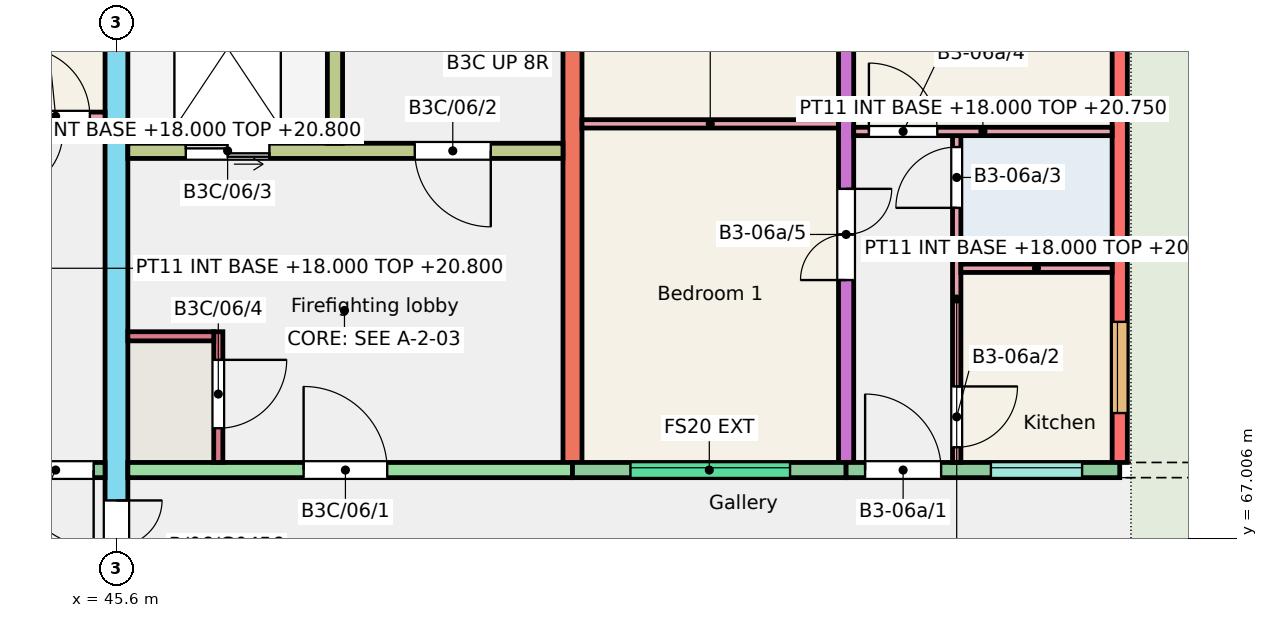
"""IFC4 building model, lengths in metres.
Left out: names, types, materials, properties, quantities, classifications, styles, units other than length and angle.
Written with IfcOpenShell. Run it as: python <this file> out.ifc"""

import sys

from ifc_helpers import new_model, si_unit, direction, frame, frame_2d, origin, place, context, subcontext, project, spatial, rectangle, extrude, element, fill, save


model = new_model("IFC4")
c1 = context("Model", 3, precision=1e-05, world=origin(), true_north=direction((0.0, 1.0)))
c2 = subcontext(c1, "Body", "Model", "MODEL_VIEW")
j1 = project(units=[si_unit("LENGTHUNIT", "METRE"), si_unit("PLANEANGLEUNIT", "RADIAN")], contexts=[c1])
p1 = place(None, origin())
s1 = spatial("IfcSite", under=j1, at=p1, CompositionType="ELEMENT")
p2 = place(p1, origin())
s2 = spatial("IfcBuilding", under=s1, at=p2, CompositionType="ELEMENT")
p3 = place(p2, frame((0.0, 0.0, 18.0)))
s3 = spatial("IfcBuildingStorey", under=s2, at=p3, CompositionType="ELEMENT", Elevation=18.0)
p4 = place(p3, frame((45.6, 66.0, 0.0), z_axis=(0.0, 0.0, 1.0), x_axis=(0.0, 1.0, 0.0)))
e1 = element("IfcWall", 1, at=p4, inside=s3, PredefinedType="SHEAR", context=c2, shape_type="SweptSolid", body=[
    extrude(rectangle(XDim=11.0, YDim=0.3, at=frame_2d((5.5, 0.0))), origin(), (0.0, 0.0, 1.0), 3.0),
])
p5 = place(p4, frame((0.3, 0.0, 0.0)))
e2 = element("IfcOpeningElement", 2, at=p5, cuts=e1, PredefinedType="OPENING", context=c2, shape_type="SweptSolid", body=[
    extrude(rectangle(XDim=1.2, YDim=2.1, at=frame_2d((0.6, 1.05))), frame((0.0, 0.16, 0.0), z_axis=(0.0, -1.0, 0.0), x_axis=(1.0, 0.0, 0.0)), (0.0, 0.0, 1.0), 0.32),
])
p6 = place(p3, frame((51.6, 68.0, 0.0), z_axis=(0.0, 0.0, 1.0), x_axis=(0.0, 1.0, 0.0)))
e3 = element("IfcWall", 3, at=p6, inside=s3, PredefinedType="SHEAR", context=c2, shape_type="SweptSolid", body=[
    extrude(rectangle(XDim=9.0, YDim=0.25, at=frame_2d((4.5, 0.0))), origin(), (0.0, 0.0, 1.0), 3.0),
])
p7 = place(p3, frame((55.2, 68.0, 0.0), z_axis=(0.0, 0.0, 1.0), x_axis=(0.0, 1.0, 0.0)))
e4 = element("IfcWall", 4, at=p7, inside=s3, PredefinedType="SHEAR", context=c2, shape_type="SweptSolid", body=[
    extrude(rectangle(XDim=9.0, YDim=0.2, at=frame_2d((4.5, 0.0))), origin(), (0.0, 0.0, 1.0), 3.0),
])
p8 = place(p7, frame((2.4, 0.0, 0.0)))
e5 = element("IfcOpeningElement", 5, at=p8, cuts=e4, PredefinedType="OPENING", context=c2, shape_type="SweptSolid", body=[
    extrude(rectangle(XDim=1.2, YDim=2.1, at=frame_2d((0.6, 1.05))), frame((0.0, 0.11, 0.0), z_axis=(0.0, -1.0, 0.0), x_axis=(1.0, 0.0, 0.0)), (0.0, 0.0, 1.0), 0.22),
])
p9 = place(p7, frame((6.4, 0.0, 0.0)))
e6 = element("IfcOpeningElement", 6, at=p9, cuts=e4, PredefinedType="OPENING", context=c2, shape_type="SweptSolid", body=[
    extrude(rectangle(XDim=1.2, YDim=2.1, at=frame_2d((0.6, 1.05))), frame((0.0, 0.11, 0.0), z_axis=(0.0, -1.0, 0.0), x_axis=(1.0, 0.0, 0.0)), (0.0, 0.0, 1.0), 0.22),
])
p10 = place(p3, frame((58.8, 68.0, 0.0), z_axis=(0.0, 0.0, 1.0), x_axis=(0.0, 1.0, 0.0)))
e7 = element("IfcWall", 7, at=p10, inside=s3, PredefinedType="SHEAR", context=c2, shape_type="SweptSolid", body=[
    extrude(rectangle(XDim=9.0, YDim=0.2, at=frame_2d((4.5, 0.0))), origin(), (0.0, 0.0, 1.0), 3.0),
])
p11 = place(p10, frame((0.65, 0.0, 0.9)))
e8 = element("IfcOpeningElement", 8, at=p11, cuts=e7, PredefinedType="OPENING", context=c2, shape_type="SweptSolid", body=[
    extrude(rectangle(XDim=1.2, YDim=1.5, at=frame_2d((0.6, 0.75))), frame((0.0, 0.11, 0.0), z_axis=(0.0, -1.0, 0.0), x_axis=(1.0, 0.0, 0.0)), (0.0, 0.0, 1.0), 0.22),
])
p12 = place(p10, frame((7.552, 0.0, 0.9)))
e9 = element("IfcOpeningElement", 9, at=p12, cuts=e7, PredefinedType="OPENING", context=c2, shape_type="SweptSolid", body=[
    extrude(rectangle(XDim=1.2, YDim=1.5, at=frame_2d((0.6, 0.75))), frame((0.0, 0.11, 0.0), z_axis=(0.0, -1.0, 0.0), x_axis=(1.0, 0.0, 0.0)), (0.0, 0.0, 1.0), 0.22),
])
p13 = place(p10, frame((6.205, 0.0, 0.0)))
e10 = element("IfcOpeningElement", 10, at=p13, cuts=e7, PredefinedType="OPENING", context=c2, shape_type="SweptSolid", body=[
    extrude(rectangle(XDim=1.0, YDim=2.1, at=frame_2d((0.5, 1.05))), frame((0.0, 0.11, 0.0), z_axis=(0.0, -1.0, 0.0), x_axis=(1.0, 0.0, 0.0)), (0.0, 0.0, 1.0), 0.22),
])
p14 = place(p3, frame((42.0, 67.9, 0.0), z_axis=(0.0, 0.0, 1.0), x_axis=(1.0, 0.0, 0.0)))
e11 = element("IfcWall", 11, at=p14, inside=s3, PredefinedType="SOLIDWALL", context=c2, shape_type="SweptSolid", body=[
    extrude(rectangle(XDim=3.45, YDim=0.2, at=frame_2d((1.725, 0.0))), origin(), (0.0, 0.0, 1.0), 3.0),
])
p15 = place(p14, frame((0.47, 0.0, 1.1)))
e12 = element("IfcOpeningElement", 12, at=p15, cuts=e11, PredefinedType="OPENING", context=c2, shape_type="SweptSolid", body=[
    extrude(rectangle(XDim=1.2, YDim=1.3, at=frame_2d((0.6, 0.65))), frame((0.0, 0.11, 0.0), z_axis=(0.0, -1.0, 0.0), x_axis=(1.0, 0.0, 0.0)), (0.0, 0.0, 1.0), 0.22),
])
p16 = place(p14, frame((2.3, 0.0, 0.0)))
e13 = element("IfcOpeningElement", 13, at=p16, cuts=e11, PredefinedType="OPENING", context=c2, shape_type="SweptSolid", body=[
    extrude(rectangle(XDim=1.0, YDim=2.1, at=frame_2d((0.5, 1.05))), frame((0.0, 0.11, 0.0), z_axis=(0.0, -1.0, 0.0), x_axis=(1.0, 0.0, 0.0)), (0.0, 0.0, 1.0), 0.22),
])
p17 = place(p3, frame((45.75, 67.9, 0.0), z_axis=(0.0, 0.0, 1.0), x_axis=(1.0, 0.0, 0.0)))
e14 = element("IfcWall", 14, at=p17, inside=s3, PredefinedType="SHEAR", context=c2, shape_type="SweptSolid", body=[
    extrude(rectangle(XDim=5.85, YDim=0.2, at=frame_2d((2.925, 0.0))), origin(), (0.0, 0.0, 1.0), 3.0),
])
p18 = place(p17, frame((2.312, 0.0, 0.0)))
e15 = element("IfcOpeningElement", 15, at=p18, cuts=e14, PredefinedType="OPENING", context=c2, shape_type="SweptSolid", body=[
    extrude(rectangle(XDim=1.1, YDim=2.1, at=frame_2d((0.55, 1.05))), frame((0.0, 0.11, 0.0), z_axis=(0.0, -1.0, 0.0), x_axis=(1.0, 0.0, 0.0)), (0.0, 0.0, 1.0), 0.22),
])
p19 = place(p3, frame((45.75, 72.1, 0.0), z_axis=(0.0, 0.0, 1.0), x_axis=(1.0, 0.0, 0.0)))
e16 = element("IfcWall", 16, at=p19, inside=s3, PredefinedType="SHEAR", context=c2, shape_type="SweptSolid", body=[
    extrude(rectangle(XDim=5.725, YDim=0.2, at=frame_2d((2.863, 0.0))), origin(), (0.0, 0.0, 1.0), 3.0),
])
p20 = place(p19, frame((3.775, 0.0, 0.0)))
e17 = element("IfcOpeningElement", 17, at=p20, cuts=e16, PredefinedType="OPENING", context=c2, shape_type="SweptSolid", body=[
    extrude(rectangle(XDim=1.0, YDim=2.1, at=frame_2d((0.5, 1.05))), frame((0.0, 0.11, 0.0), z_axis=(0.0, -1.0, 0.0), x_axis=(1.0, 0.0, 0.0)), (0.0, 0.0, 1.0), 0.22),
])
p21 = place(p19, frame((0.762, 0.0, 0.0)))
e18 = element("IfcOpeningElement", 18, at=p21, cuts=e16, PredefinedType="OPENING", context=c2, shape_type="SweptSolid", body=[
    extrude(rectangle(XDim=1.1, YDim=2.1, at=frame_2d((0.55, 1.05))), frame((0.0, 0.11, 0.0), z_axis=(0.0, -1.0, 0.0), x_axis=(1.0, 0.0, 0.0)), (0.0, 0.0, 1.0), 0.22),
])
p22 = place(p3, frame((48.475, 72.2, 0.0), z_axis=(0.0, 0.0, 1.0), x_axis=(0.0, 1.0, 0.0)))
e19 = element("IfcWall", 19, at=p22, inside=s3, PredefinedType="SHEAR", context=c2, shape_type="SweptSolid", body=[
    extrude(rectangle(XDim=4.8, YDim=0.2, at=frame_2d((2.4, 0.0))), origin(), (0.0, 0.0, 1.0), 3.0),
])
p23 = place(p3, frame((46.94, 68.0, 0.0), z_axis=(0.0, 0.0, 1.0), x_axis=(0.0, 1.0, 0.0)))
e20 = element("IfcWall", 20, at=p23, inside=s3, PredefinedType="SHEAR", context=c2, shape_type="SweptSolid", body=[
    extrude(rectangle(XDim=1.72, YDim=0.12, at=frame_2d((0.86, 0.0))), origin(), (0.0, 0.0, 1.0), 3.0),
])
p24 = place(p23, frame((0.45, 0.0, 0.0)))
e21 = element("IfcOpeningElement", 21, at=p24, cuts=e20, PredefinedType="OPENING", context=c2, shape_type="SweptSolid", body=[
    extrude(rectangle(XDim=0.9, YDim=2.1, at=frame_2d((0.45, 1.05))), frame((0.0, 0.07, 0.0), z_axis=(0.0, -1.0, 0.0), x_axis=(1.0, 0.0, 0.0)), (0.0, 0.0, 1.0), 0.14),
])
p25 = place(p3, frame((45.75, 69.66, 0.0), z_axis=(0.0, 0.0, 1.0), x_axis=(1.0, 0.0, 0.0)))
e22 = element("IfcWall", 22, at=p25, inside=s3, PredefinedType="SHEAR", context=c2, shape_type="SweptSolid", body=[
    extrude(rectangle(XDim=1.13, YDim=0.12, at=frame_2d((0.565, 0.0))), origin(), (0.0, 0.0, 1.0), 3.0),
])
p26 = place(p3, frame((51.6, 67.9, 0.0), z_axis=(0.0, 0.0, 1.0), x_axis=(1.0, 0.0, 0.0)))
e23 = element("IfcWall", 23, at=p26, inside=s3, PredefinedType="SOLIDWALL", context=c2, shape_type="SweptSolid", body=[
    extrude(rectangle(XDim=3.6, YDim=0.2, at=frame_2d((1.8, 0.0))), origin(), (0.0, 0.0, 1.0), 3.0),
])
p27 = place(p26, frame((0.762, 0.0, 1.2)))
e24 = element("IfcOpeningElement", 24, at=p27, cuts=e23, PredefinedType="OPENING", context=c2, shape_type="SweptSolid", body=[
    extrude(rectangle(XDim=2.1, YDim=1.2, at=frame_2d((1.05, 0.6))), frame((0.0, 0.11, 0.0), z_axis=(0.0, -1.0, 0.0), x_axis=(1.0, 0.0, 0.0)), (0.0, 0.0, 1.0), 0.22),
])
p28 = place(p3, frame((55.2, 67.9, 0.0), z_axis=(0.0, 0.0, 1.0), x_axis=(1.0, 0.0, 0.0)))
e25 = element("IfcWall", 25, at=p28, inside=s3, PredefinedType="SOLIDWALL", context=c2, shape_type="SweptSolid", body=[
    extrude(rectangle(XDim=3.6, YDim=0.2, at=frame_2d((1.8, 0.0))), origin(), (0.0, 0.0, 1.0), 3.0),
])
p29 = place(p28, frame((1.905, 0.0, 1.1)))
e26 = element("IfcOpeningElement", 26, at=p29, cuts=e25, PredefinedType="OPENING", context=c2, shape_type="SweptSolid", body=[
    extrude(rectangle(XDim=1.2, YDim=1.3, at=frame_2d((0.6, 0.65))), frame((0.0, 0.11, 0.0), z_axis=(0.0, -1.0, 0.0), x_axis=(1.0, 0.0, 0.0)), (0.0, 0.0, 1.0), 0.22),
])
p30 = place(p28, frame((0.25, 0.0, 0.0)))
e27 = element("IfcOpeningElement", 27, at=p30, cuts=e25, PredefinedType="OPENING", context=c2, shape_type="SweptSolid", body=[
    extrude(rectangle(XDim=1.0, YDim=2.1, at=frame_2d((0.5, 1.05))), frame((0.0, 0.11, 0.0), z_axis=(0.0, -1.0, 0.0), x_axis=(1.0, 0.0, 0.0)), (0.0, 0.0, 1.0), 0.22),
])
p31 = place(p3, frame((42.1, 72.555, 0.0), z_axis=(0.0, 0.0, 1.0), x_axis=(1.0, 0.0, 0.0)))
e28 = element("IfcWall", 28, at=p31, inside=s3, PredefinedType="PARTITIONING", context=c2, shape_type="SweptSolid", body=[
    extrude(rectangle(XDim=3.35, YDim=0.11, at=frame_2d((1.675, 0.0))), origin(), (0.0, 0.0, 1.0), 2.8),
])
p32 = place(p31, frame((2.25, 0.0, 0.0)))
e29 = element("IfcOpeningElement", 29, at=p32, cuts=e28, PredefinedType="OPENING", context=c2, shape_type="SweptSolid", body=[
    extrude(rectangle(XDim=0.9, YDim=2.1, at=frame_2d((0.45, 1.05))), frame((0.0, 0.065, 0.0), z_axis=(0.0, -1.0, 0.0), x_axis=(1.0, 0.0, 0.0)), (0.0, 0.0, 1.0), 0.13),
])
p33 = place(p3, frame((56.655, 68.0, 0.0), z_axis=(0.0, 0.0, 1.0), x_axis=(0.0, 1.0, 0.0)))
e30 = element("IfcWall", 30, at=p33, inside=s3, PredefinedType="PARTITIONING", context=c2, shape_type="SweptSolid", body=[
    extrude(rectangle(XDim=4.3, YDim=0.11, at=frame_2d((2.15, 0.0))), origin(), (0.0, 0.0, 1.0), 2.75),
])
p34 = place(p33, frame((0.2, 0.0, 0.0)))
e31 = element("IfcOpeningElement", 31, at=p34, cuts=e30, PredefinedType="OPENING", context=c2, shape_type="SweptSolid", body=[
    extrude(rectangle(XDim=0.8, YDim=2.1, at=frame_2d((0.4, 1.05))), frame((0.0, 0.065, 0.0), z_axis=(0.0, -1.0, 0.0), x_axis=(1.0, 0.0, 0.0)), (0.0, 0.0, 1.0), 0.13),
])
p35 = place(p33, frame((3.35, 0.0, 0.0)))
e32 = element("IfcOpeningElement", 32, at=p35, cuts=e30, PredefinedType="OPENING", context=c2, shape_type="SweptSolid", body=[
    extrude(rectangle(XDim=0.8, YDim=2.1, at=frame_2d((0.4, 1.05))), frame((0.0, 0.065, 0.0), z_axis=(0.0, -1.0, 0.0), x_axis=(1.0, 0.0, 0.0)), (0.0, 0.0, 1.0), 0.13),
])
p36 = place(p3, frame((56.71, 70.555, 0.0), z_axis=(0.0, 0.0, 1.0), x_axis=(1.0, 0.0, 0.0)))
e33 = element("IfcWall", 33, at=p36, inside=s3, PredefinedType="PARTITIONING", context=c2, shape_type="SweptSolid", body=[
    extrude(rectangle(XDim=1.99, YDim=0.11, at=frame_2d((0.995, 0.0))), origin(), (0.0, 0.0, 1.0), 2.75),
])
p37 = place(p3, frame((55.3, 72.355, 0.0), z_axis=(0.0, 0.0, 1.0), x_axis=(1.0, 0.0, 0.0)))
e34 = element("IfcWall", 34, at=p37, inside=s3, PredefinedType="PARTITIONING", context=c2, shape_type="SweptSolid", body=[
    extrude(rectangle(XDim=3.4, YDim=0.11, at=frame_2d((1.7, 0.0))), origin(), (0.0, 0.0, 1.0), 2.75),
])
p38 = place(p37, frame((0.2, 0.0, 0.0)))
e35 = element("IfcOpeningElement", 35, at=p38, cuts=e34, PredefinedType="OPENING", context=c2, shape_type="SweptSolid", body=[
    extrude(rectangle(XDim=0.9, YDim=2.1, at=frame_2d((0.45, 1.05))), frame((0.0, 0.065, 0.0), z_axis=(0.0, -1.0, 0.0), x_axis=(1.0, 0.0, 0.0)), (0.0, 0.0, 1.0), 0.13),
])
p39 = place(p3, frame((51.725, 72.455, 0.0), z_axis=(0.0, 0.0, 1.0), x_axis=(1.0, 0.0, 0.0)))
e36 = element("IfcWall", 36, at=p39, inside=s3, PredefinedType="PARTITIONING", context=c2, shape_type="SweptSolid", body=[
    extrude(rectangle(XDim=3.375, YDim=0.11, at=frame_2d((1.688, 0.0))), origin(), (0.0, 0.0, 1.0), 2.8),
])
p40 = place(p27, origin())
e37 = element("IfcWindow", 37, at=p40, inside=s3, PartitioningType="SINGLE_PANEL", PredefinedType="WINDOW", context=c2, shape_type="SweptSolid", body=[
    extrude(rectangle(XDim=2.1, YDim=1.2, at=frame_2d((1.05, 0.6))), frame((0.0, 0.06, 0.0), z_axis=(0.0, -1.0, 0.0), x_axis=(1.0, 0.0, 0.0)), (0.0, 0.0, 1.0), 0.06),
])
fill(e24, e37)
p41 = place(p29, origin())
e38 = element("IfcWindow", 38, at=p41, inside=s3, PartitioningType="SINGLE_PANEL", PredefinedType="WINDOW", context=c2, shape_type="SweptSolid", body=[
    extrude(rectangle(XDim=1.2, YDim=1.3, at=frame_2d((0.6, 0.65))), frame((0.0, 0.06, 0.0), z_axis=(0.0, -1.0, 0.0), x_axis=(1.0, 0.0, 0.0)), (0.0, 0.0, 1.0), 0.06),
])
fill(e26, e38)
p42 = place(p11, origin())
e39 = element("IfcWindow", 39, at=p42, inside=s3, PartitioningType="SINGLE_PANEL", PredefinedType="WINDOW", context=c2, shape_type="SweptSolid", body=[
    extrude(rectangle(XDim=1.2, YDim=1.5, at=frame_2d((0.6, 0.75))), frame((0.0, 0.06, 0.0), z_axis=(0.0, -1.0, 0.0), x_axis=(1.0, 0.0, 0.0)), (0.0, 0.0, 1.0), 0.06),
])
fill(e8, e39)
p43 = place(p16, origin())
e40 = element("IfcDoor", 40, at=p43, inside=s3, OperationType="SINGLE_SWING_RIGHT", PredefinedType="DOOR", context=c2, shape_type="SweptSolid", body=[
    extrude(rectangle(XDim=1.0, YDim=2.1, at=frame_2d((0.5, 1.05))), frame((0.0, 0.025, 0.0), z_axis=(0.0, -1.0, 0.0), x_axis=(1.0, 0.0, 0.0)), (0.0, 0.0, 1.0), 0.05),
])
fill(e13, e40)
p44 = place(p32, origin())
e41 = element("IfcDoor", 41, at=p44, inside=s3, OperationType="SINGLE_SWING_LEFT", PredefinedType="DOOR", context=c2, shape_type="SweptSolid", body=[
    extrude(rectangle(XDim=0.9, YDim=2.1, at=frame_2d((0.45, 1.05))), frame((0.0, 0.025, 0.0), z_axis=(0.0, -1.0, 0.0), x_axis=(1.0, 0.0, 0.0)), (0.0, 0.0, 1.0), 0.05),
])
fill(e29, e41)
p45 = place(p30, origin())
e42 = element("IfcDoor", 42, at=p45, inside=s3, OperationType="SINGLE_SWING_LEFT", PredefinedType="DOOR", context=c2, shape_type="SweptSolid", body=[
    extrude(rectangle(XDim=1.0, YDim=2.1, at=frame_2d((0.5, 1.05))), frame((0.0, 0.025, 0.0), z_axis=(0.0, -1.0, 0.0), x_axis=(1.0, 0.0, 0.0)), (0.0, 0.0, 1.0), 0.05),
])
fill(e27, e42)
p46 = place(p34, origin())
e43 = element("IfcDoor", 43, at=p46, inside=s3, OperationType="SINGLE_SWING_RIGHT", PredefinedType="DOOR", context=c2, shape_type="SweptSolid", body=[
    extrude(rectangle(XDim=0.8, YDim=2.1, at=frame_2d((0.4, 1.05))), frame((0.0, 0.025, 0.0), z_axis=(0.0, -1.0, 0.0), x_axis=(1.0, 0.0, 0.0)), (0.0, 0.0, 1.0), 0.05),
])
fill(e31, e43)
p47 = place(p35, origin())
e44 = element("IfcDoor", 44, at=p47, inside=s3, OperationType="SINGLE_SWING_LEFT", PredefinedType="DOOR", context=c2, shape_type="SweptSolid", body=[
    extrude(rectangle(XDim=0.8, YDim=2.1, at=frame_2d((0.4, 1.05))), frame((0.0, 0.025, 0.0), z_axis=(0.0, -1.0, 0.0), x_axis=(1.0, 0.0, 0.0)), (0.0, 0.0, 1.0), 0.05),
])
fill(e32, e44)
p48 = place(p38, origin())
e45 = element("IfcDoor", 45, at=p48, inside=s3, OperationType="SINGLE_SWING_LEFT", PredefinedType="DOOR", context=c2, shape_type="SweptSolid", body=[
    extrude(rectangle(XDim=0.9, YDim=2.1, at=frame_2d((0.45, 1.05))), frame((0.0, 0.025, 0.0), z_axis=(0.0, -1.0, 0.0), x_axis=(1.0, 0.0, 0.0)), (0.0, 0.0, 1.0), 0.05),
])
fill(e35, e45)
p49 = place(p8, origin())
e46 = element("IfcDoor", 46, at=p49, inside=s3, OperationType="DOUBLE_DOOR_SINGLE_SWING", PredefinedType="DOOR", context=c2, shape_type="SweptSolid", body=[
    extrude(rectangle(XDim=1.2, YDim=2.1, at=frame_2d((0.6, 1.05))), frame((0.0, 0.025, 0.0), z_axis=(0.0, -1.0, 0.0), x_axis=(1.0, 0.0, 0.0)), (0.0, 0.0, 1.0), 0.05),
])
fill(e5, e46)
p50 = place(p18, origin())
e47 = element("IfcDoor", 47, at=p50, inside=s3, OperationType="SINGLE_SWING_LEFT", PredefinedType="DOOR", context=c2, shape_type="SweptSolid", body=[
    extrude(rectangle(XDim=1.1, YDim=2.1, at=frame_2d((0.55, 1.05))), frame((0.0, 0.025, 0.0), z_axis=(0.0, -1.0, 0.0), x_axis=(1.0, 0.0, 0.0)), (0.0, 0.0, 1.0), 0.05),
])
fill(e15, e47)
p51 = place(p20, origin())
e48 = element("IfcDoor", 48, at=p51, inside=s3, OperationType="SINGLE_SWING_RIGHT", PredefinedType="DOOR", context=c2, shape_type="SweptSolid", body=[
    extrude(rectangle(XDim=1.0, YDim=2.1, at=frame_2d((0.5, 1.05))), frame((0.0, 0.025, 0.0), z_axis=(0.0, -1.0, 0.0), x_axis=(1.0, 0.0, 0.0)), (0.0, 0.0, 1.0), 0.05),
])
fill(e17, e48)
p52 = place(p21, origin())
e49 = element("IfcDoor", 49, at=p52, inside=s3, OperationType="DOUBLE_DOOR_SLIDING", PredefinedType="DOOR", context=c2, shape_type="SweptSolid", body=[
    extrude(rectangle(XDim=1.1, YDim=2.1, at=frame_2d((0.55, 1.05))), frame((0.0, 0.025, 0.0), z_axis=(0.0, -1.0, 0.0), x_axis=(1.0, 0.0, 0.0)), (0.0, 0.0, 1.0), 0.05),
])
fill(e18, e49)
p53 = place(p24, origin())
e50 = element("IfcDoor", 50, at=p53, inside=s3, OperationType="SINGLE_SWING_RIGHT", PredefinedType="DOOR", context=c2, shape_type="SweptSolid", body=[
    extrude(rectangle(XDim=0.9, YDim=2.1, at=frame_2d((0.45, 1.05))), frame((0.0, 0.025, 0.0), z_axis=(0.0, -1.0, 0.0), x_axis=(1.0, 0.0, 0.0)), (0.0, 0.0, 1.0), 0.05),
])
fill(e21, e50)
p54 = place(p5, origin())
e51 = element("IfcDoor", 51, at=p54, inside=s3, OperationType="DOUBLE_DOOR_SINGLE_SWING", PredefinedType="DOOR", context=c2, shape_type="SweptSolid", body=[
    extrude(rectangle(XDim=1.2, YDim=2.1, at=frame_2d((0.6, 1.05))), frame((0.0, 0.025, 0.0), z_axis=(0.0, -1.0, 0.0), x_axis=(1.0, 0.0, 0.0)), (0.0, 0.0, 1.0), 0.05),
])
fill(e2, e51)
save(model, sys.argv[1])
